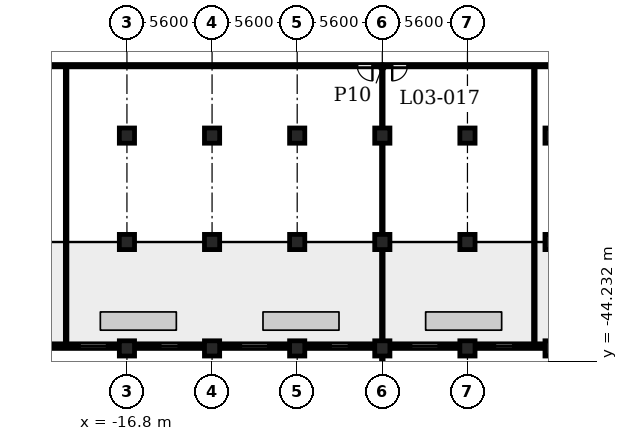
"""IFC4 building model, lengths in metres.
Left out: names, types, materials, properties, quantities, classifications, styles, units other than length and angle.
Written with IfcOpenShell. Run it as: python <this file> out.ifc"""

import sys

from ifc_helpers import new_model, si_unit, direction, frame, frame_2d, origin, origin_2d, place, context, subcontext, project, spatial, rectangle, circle, extrude, element, fill, save


model = new_model("IFC4")
c1 = context("Model", 3, precision=1e-05, world=origin(), true_north=direction((0.0, 1.0)))
c2 = subcontext(c1, "Body", "Model", "MODEL_VIEW")
j1 = project(units=[si_unit("LENGTHUNIT", "METRE"), si_unit("PLANEANGLEUNIT", "RADIAN")], contexts=[c1])
p1 = place(None, origin())
s1 = spatial("IfcSite", under=j1, at=p1, CompositionType="ELEMENT")
p2 = place(p1, origin())
s2 = spatial("IfcBuilding", under=s1, at=p2, CompositionType="ELEMENT")
p3 = place(p2, frame((0.0, 0.0, 16.1)))
s3 = spatial("IfcBuildingStorey", under=s2, at=p3, CompositionType="ELEMENT", Elevation=16.1)
for number, where, z_axis, x_axis in (
    (1, (-16.8, -29.4, 0.0), (0.0, 0.0, 1.0), (1.0, 0.0, 0.0)),
    (2, (-11.2, -29.4, 0.0), (0.0, 0.0, 1.0), (1.0, 0.0, 0.0)),
    (3, (-5.6, -29.4, 0.0), (0.0, 0.0, 1.0), (1.0, 0.0, 0.0)),
    (4, (0.0, -29.4, 0.0), (0.0, 0.0, 1.0), (1.0, 0.0, 0.0)),
    (5, (5.6, -29.4, 0.0), (0.0, 0.0, 1.0), (1.0, 0.0, 0.0)),
    (6, (11.2, -29.4, 0.0), (0.0, 0.0, 1.0), (1.0, 0.0, 0.0)),
    (7, (-16.8, -36.4, 0.0), (0.0, 0.0, 1.0), (1.0, 0.0, 0.0)),
    (8, (-11.2, -36.4, 0.0), (0.0, 0.0, 1.0), (1.0, 0.0, 0.0)),
    (9, (-5.6, -36.4, 0.0), (0.0, 0.0, 1.0), (1.0, 0.0, 0.0)),
    (10, (0.0, -36.4, 0.0), (0.0, 0.0, 1.0), (1.0, 0.0, 0.0)),
    (11, (5.6, -36.4, 0.0), (0.0, 0.0, 1.0), (1.0, 0.0, 0.0)),
    (12, (11.2, -36.4, 0.0), (0.0, 0.0, 1.0), (1.0, 0.0, 0.0)),
    (13, (-16.8, -43.4, 0.0), (0.0, 0.0, 1.0), (1.0, 0.0, 0.0)),
    (14, (-11.2, -43.4, 0.0), (0.0, 0.0, 1.0), (1.0, 0.0, 0.0)),
    (15, (-5.6, -43.4, 0.0), (0.0, 0.0, 1.0), (1.0, 0.0, 0.0)),
    (16, (0.0, -43.4, 0.0), (0.0, 0.0, 1.0), (1.0, 0.0, 0.0)),
    (17, (5.6, -43.4, 0.0), (0.0, 0.0, 1.0), (1.0, 0.0, 0.0)),
    (18, (11.2, -43.4, 0.0), (0.0, 0.0, 1.0), (1.0, 0.0, 0.0)),
):
    element("IfcColumn", number, at=place(p3, frame(where, z_axis=z_axis, x_axis=x_axis)), inside=s3, PredefinedType="COLUMN", context=c2, shape_type="SweptSolid", body=[
        extrude(circle(Radius=0.5, at=origin_2d()), origin(), (0.0, 0.0, 1.0), 4.8),
    ])
p4 = place(p3, frame((-21.9, -43.25, 0.0), z_axis=(0.0, 0.0, 1.0), x_axis=(1.0, 0.0, 0.0)))
e19 = element("IfcWall", 19, at=p4, inside=s3, PredefinedType="SOLIDWALL", context=c2, shape_type="SweptSolid", body=[
    extrude(rectangle(XDim=4.6, YDim=0.3, at=frame_2d((2.3, 0.0))), origin(), (0.0, 0.0, 1.0), 3.65),
])
p5 = place(p4, frame((1.988, 0.0, 0.9)))
e20 = element("IfcOpeningElement", 20, at=p5, cuts=e19, PredefinedType="OPENING", context=c2, shape_type="SweptSolid", body=[
    extrude(rectangle(XDim=1.8, YDim=1.25, at=frame_2d((0.9, 0.625))), frame((0.0, 0.16, 0.0), z_axis=(0.0, -1.0, 0.0), x_axis=(1.0, 0.0, 0.0)), (0.0, 0.0, 1.0), 0.32),
])
p6 = place(p3, frame((-16.3, -43.25, 0.0), z_axis=(0.0, 0.0, 1.0), x_axis=(1.0, 0.0, 0.0)))
e21 = element("IfcWall", 21, at=p6, inside=s3, PredefinedType="SOLIDWALL", context=c2, shape_type="SweptSolid", body=[
    extrude(rectangle(XDim=4.6, YDim=0.3, at=frame_2d((2.3, 0.0))), origin(), (0.0, 0.0, 1.0), 3.65),
])
p7 = place(p6, frame((1.7, 0.0, 0.6)))
e22 = element("IfcOpeningElement", 22, at=p7, cuts=e21, PredefinedType="OPENING", context=c2, shape_type="SweptSolid", body=[
    extrude(rectangle(XDim=1.2, YDim=1.55, at=frame_2d((0.6, 0.775))), frame((0.0, 0.16, 0.0), z_axis=(0.0, -1.0, 0.0), x_axis=(1.0, 0.0, 0.0)), (0.0, 0.0, 1.0), 0.32),
])
p8 = place(p3, frame((-10.7, -43.25, 0.0), z_axis=(0.0, 0.0, 1.0), x_axis=(1.0, 0.0, 0.0)))
e23 = element("IfcWall", 23, at=p8, inside=s3, PredefinedType="SOLIDWALL", context=c2, shape_type="SweptSolid", body=[
    extrude(rectangle(XDim=4.6, YDim=0.3, at=frame_2d((2.3, 0.0))), origin(), (0.0, 0.0, 1.0), 3.65),
])
p9 = place(p8, frame((1.4, 0.0, 0.9)))
e24 = element("IfcOpeningElement", 24, at=p9, cuts=e23, PredefinedType="OPENING", context=c2, shape_type="SweptSolid", body=[
    extrude(rectangle(XDim=1.8, YDim=1.25, at=frame_2d((0.9, 0.625))), frame((0.0, 0.16, 0.0), z_axis=(0.0, -1.0, 0.0), x_axis=(1.0, 0.0, 0.0)), (0.0, 0.0, 1.0), 0.32),
])
p10 = place(p3, frame((-5.1, -43.25, 0.0), z_axis=(0.0, 0.0, 1.0), x_axis=(1.0, 0.0, 0.0)))
e25 = element("IfcWall", 25, at=p10, inside=s3, PredefinedType="SOLIDWALL", context=c2, shape_type="SweptSolid", body=[
    extrude(rectangle(XDim=4.6, YDim=0.3, at=frame_2d((2.3, 0.0))), origin(), (0.0, 0.0, 1.0), 3.65),
])
p11 = place(p10, frame((1.7, 0.0, 0.6)))
e26 = element("IfcOpeningElement", 26, at=p11, cuts=e25, PredefinedType="OPENING", context=c2, shape_type="SweptSolid", body=[
    extrude(rectangle(XDim=1.2, YDim=1.55, at=frame_2d((0.6, 0.775))), frame((0.0, 0.16, 0.0), z_axis=(0.0, -1.0, 0.0), x_axis=(1.0, 0.0, 0.0)), (0.0, 0.0, 1.0), 0.32),
])
p12 = place(p3, frame((0.5, -43.25, 0.0), z_axis=(0.0, 0.0, 1.0), x_axis=(1.0, 0.0, 0.0)))
e27 = element("IfcWall", 27, at=p12, inside=s3, PredefinedType="SOLIDWALL", context=c2, shape_type="SweptSolid", body=[
    extrude(rectangle(XDim=4.6, YDim=0.3, at=frame_2d((2.3, 0.0))), origin(), (0.0, 0.0, 1.0), 3.65),
])
p13 = place(p12, frame((1.4, 0.0, 0.9)))
e28 = element("IfcOpeningElement", 28, at=p13, cuts=e27, PredefinedType="OPENING", context=c2, shape_type="SweptSolid", body=[
    extrude(rectangle(XDim=1.8, YDim=1.25, at=frame_2d((0.9, 0.625))), frame((0.0, 0.16, 0.0), z_axis=(0.0, -1.0, 0.0), x_axis=(1.0, 0.0, 0.0)), (0.0, 0.0, 1.0), 0.32),
])
p14 = place(p3, frame((6.1, -43.25, 0.0), z_axis=(0.0, 0.0, 1.0), x_axis=(1.0, 0.0, 0.0)))
e29 = element("IfcWall", 29, at=p14, inside=s3, PredefinedType="SOLIDWALL", context=c2, shape_type="SweptSolid", body=[
    extrude(rectangle(XDim=4.6, YDim=0.3, at=frame_2d((2.3, 0.0))), origin(), (0.0, 0.0, 1.0), 3.65),
])
p15 = place(p14, frame((1.312, 0.0, 0.6)))
e30 = element("IfcOpeningElement", 30, at=p15, cuts=e29, PredefinedType="OPENING", context=c2, shape_type="SweptSolid", body=[
    extrude(rectangle(XDim=1.2, YDim=1.55, at=frame_2d((0.6, 0.775))), frame((0.0, 0.16, 0.0), z_axis=(0.0, -1.0, 0.0), x_axis=(1.0, 0.0, 0.0)), (0.0, 0.0, 1.0), 0.32),
])
p16 = place(p3, frame((-37.0, -24.8, 0.0), z_axis=(0.0, 0.0, 1.0), x_axis=(1.0, 0.0, 0.0)))
e31 = element("IfcWall", 31, at=p16, inside=s3, PredefinedType="PARTITIONING", context=c2, shape_type="SweptSolid", body=[
    extrude(rectangle(XDim=74.0, YDim=0.15, at=frame_2d((37.0, 0.0))), origin(), (0.0, 0.0, 1.0), 4.45),
])
p17 = place(p16, frame((2.65, 0.0, 0.0)))
e32 = element("IfcOpeningElement", 32, at=p17, cuts=e31, PredefinedType="OPENING", context=c2, shape_type="SweptSolid", body=[
    extrude(rectangle(XDim=1.0, YDim=2.1, at=frame_2d((0.5, 1.05))), frame((0.0, 0.085, 0.0), z_axis=(0.0, -1.0, 0.0), x_axis=(1.0, 0.0, 0.0)), (0.0, 0.0, 1.0), 0.17),
])
p18 = place(p16, frame((4.85, 0.0, 0.0)))
e33 = element("IfcOpeningElement", 33, at=p18, cuts=e31, PredefinedType="OPENING", context=c2, shape_type="SweptSolid", body=[
    extrude(rectangle(XDim=1.0, YDim=2.1, at=frame_2d((0.5, 1.05))), frame((0.0, 0.085, 0.0), z_axis=(0.0, -1.0, 0.0), x_axis=(1.0, 0.0, 0.0)), (0.0, 0.0, 1.0), 0.17),
])
p19 = place(p16, frame((35.35, 0.0, 0.0)))
e34 = element("IfcOpeningElement", 34, at=p19, cuts=e31, PredefinedType="OPENING", context=c2, shape_type="SweptSolid", body=[
    extrude(rectangle(XDim=1.0, YDim=2.1, at=frame_2d((0.5, 1.05))), frame((0.0, 0.085, 0.0), z_axis=(0.0, -1.0, 0.0), x_axis=(1.0, 0.0, 0.0)), (0.0, 0.0, 1.0), 0.17),
])
p20 = place(p16, frame((37.65, 0.0, 0.0)))
e35 = element("IfcOpeningElement", 35, at=p20, cuts=e31, PredefinedType="OPENING", context=c2, shape_type="SweptSolid", body=[
    extrude(rectangle(XDim=1.0, YDim=2.1, at=frame_2d((0.5, 1.05))), frame((0.0, 0.085, 0.0), z_axis=(0.0, -1.0, 0.0), x_axis=(1.0, 0.0, 0.0)), (0.0, 0.0, 1.0), 0.17),
])
p21 = place(p16, frame((55.4, 0.0, 0.0)))
e36 = element("IfcOpeningElement", 36, at=p21, cuts=e31, PredefinedType="OPENING", context=c2, shape_type="SweptSolid", body=[
    extrude(rectangle(XDim=1.0, YDim=2.1, at=frame_2d((0.5, 1.05))), frame((0.0, 0.085, 0.0), z_axis=(0.0, -1.0, 0.0), x_axis=(1.0, 0.0, 0.0)), (0.0, 0.0, 1.0), 0.17),
])
p22 = place(p16, frame((57.645, 0.0, 0.0)))
e37 = element("IfcOpeningElement", 37, at=p22, cuts=e31, PredefinedType="OPENING", context=c2, shape_type="SweptSolid", body=[
    extrude(rectangle(XDim=1.0, YDim=2.1, at=frame_2d((0.5, 1.05))), frame((0.0, 0.085, 0.0), z_axis=(0.0, -1.0, 0.0), x_axis=(1.0, 0.0, 0.0)), (0.0, 0.0, 1.0), 0.17),
])
p23 = place(p16, frame((72.4, 0.0, 0.0)))
e38 = element("IfcOpeningElement", 38, at=p23, cuts=e31, PredefinedType="OPENING", context=c2, shape_type="SweptSolid", body=[
    extrude(rectangle(XDim=1.0, YDim=2.1, at=frame_2d((0.5, 1.05))), frame((0.0, 0.085, 0.0), z_axis=(0.0, -1.0, 0.0), x_axis=(1.0, 0.0, 0.0)), (0.0, 0.0, 1.0), 0.17),
])
p24 = place(p3, frame((-20.8, -43.08, 0.0), z_axis=(0.0, 0.0, 1.0), x_axis=(0.0, 1.0, 0.0)))
e39 = element("IfcWall", 39, at=p24, inside=s3, PredefinedType="PARTITIONING", context=c2, shape_type="SweptSolid", body=[
    extrude(rectangle(XDim=18.205, YDim=0.1, at=frame_2d((9.103, 0.0))), origin(), (0.0, 0.0, 1.0), 4.45),
])
p25 = place(p3, frame((0.0, -44.23, 0.0), z_axis=(0.0, 0.0, 1.0), x_axis=(0.0, 1.0, 0.0)))
e40 = element("IfcWall", 40, at=p25, inside=s3, PredefinedType="PARTITIONING", context=c2, shape_type="SweptSolid", body=[
    extrude(rectangle(XDim=19.355, YDim=0.1, at=frame_2d((9.677, 0.0))), origin(), (0.0, 0.0, 1.0), 4.45),
])
p26 = place(p3, frame((10.0, -43.08, 0.0), z_axis=(0.0, 0.0, 1.0), x_axis=(0.0, 1.0, 0.0)))
e41 = element("IfcWall", 41, at=p26, inside=s3, PredefinedType="PARTITIONING", context=c2, shape_type="SweptSolid", body=[
    extrude(rectangle(XDim=18.205, YDim=0.1, at=frame_2d((9.103, 0.0))), origin(), (0.0, 0.0, 1.0), 4.45),
])
p27 = place(p19, origin())
e42 = element("IfcDoor", 42, at=p27, inside=s3, OperationType="SINGLE_SWING_RIGHT", PredefinedType="DOOR", context=c2, shape_type="SweptSolid", body=[
    extrude(rectangle(XDim=1.0, YDim=2.1, at=frame_2d((0.5, 1.05))), frame((0.0, 0.025, 0.0), z_axis=(0.0, -1.0, 0.0), x_axis=(1.0, 0.0, 0.0)), (0.0, 0.0, 1.0), 0.05),
])
fill(e34, e42)
p28 = place(p20, origin())
e43 = element("IfcDoor", 43, at=p28, inside=s3, OperationType="SINGLE_SWING_LEFT", PredefinedType="DOOR", context=c2, shape_type="SweptSolid", body=[
    extrude(rectangle(XDim=1.0, YDim=2.1, at=frame_2d((0.5, 1.05))), frame((0.0, 0.025, 0.0), z_axis=(0.0, -1.0, 0.0), x_axis=(1.0, 0.0, 0.0)), (0.0, 0.0, 1.0), 0.05),
])
fill(e35, e43)
p29 = place(p5, origin())
e44 = element("IfcWindow", 44, at=p29, inside=s3, PartitioningType="SINGLE_PANEL", PredefinedType="WINDOW", context=c2, shape_type="SweptSolid", body=[
    extrude(rectangle(XDim=1.8, YDim=1.25, at=frame_2d((0.9, 0.625))), frame((0.0, 0.03, 0.0), z_axis=(0.0, -1.0, 0.0), x_axis=(1.0, 0.0, 0.0)), (0.0, 0.0, 1.0), 0.06),
])
fill(e20, e44)
p30 = place(p7, origin())
e45 = element("IfcWindow", 45, at=p30, inside=s3, PartitioningType="SINGLE_PANEL", PredefinedType="WINDOW", context=c2, shape_type="SweptSolid", body=[
    extrude(rectangle(XDim=1.2, YDim=1.55, at=frame_2d((0.6, 0.775))), frame((0.0, 0.03, 0.0), z_axis=(0.0, -1.0, 0.0), x_axis=(1.0, 0.0, 0.0)), (0.0, 0.0, 1.0), 0.06),
])
fill(e22, e45)
p31 = place(p9, origin())
e46 = element("IfcWindow", 46, at=p31, inside=s3, PartitioningType="SINGLE_PANEL", PredefinedType="WINDOW", context=c2, shape_type="SweptSolid", body=[
    extrude(rectangle(XDim=1.8, YDim=1.25, at=frame_2d((0.9, 0.625))), frame((0.0, 0.03, 0.0), z_axis=(0.0, -1.0, 0.0), x_axis=(1.0, 0.0, 0.0)), (0.0, 0.0, 1.0), 0.06),
])
fill(e24, e46)
p32 = place(p11, origin())
e47 = element("IfcWindow", 47, at=p32, inside=s3, PartitioningType="SINGLE_PANEL", PredefinedType="WINDOW", context=c2, shape_type="SweptSolid", body=[
    extrude(rectangle(XDim=1.2, YDim=1.55, at=frame_2d((0.6, 0.775))), frame((0.0, 0.03, 0.0), z_axis=(0.0, -1.0, 0.0), x_axis=(1.0, 0.0, 0.0)), (0.0, 0.0, 1.0), 0.06),
])
fill(e26, e47)
p33 = place(p13, origin())
e48 = element("IfcWindow", 48, at=p33, inside=s3, PartitioningType="SINGLE_PANEL", PredefinedType="WINDOW", context=c2, shape_type="SweptSolid", body=[
    extrude(rectangle(XDim=1.8, YDim=1.25, at=frame_2d((0.9, 0.625))), frame((0.0, 0.03, 0.0), z_axis=(0.0, -1.0, 0.0), x_axis=(1.0, 0.0, 0.0)), (0.0, 0.0, 1.0), 0.06),
])
fill(e28, e48)
p34 = place(p15, origin())
e49 = element("IfcWindow", 49, at=p34, inside=s3, PartitioningType="SINGLE_PANEL", PredefinedType="WINDOW", context=c2, shape_type="SweptSolid", body=[
    extrude(rectangle(XDim=1.2, YDim=1.55, at=frame_2d((0.6, 0.775))), frame((0.0, 0.03, 0.0), z_axis=(0.0, -1.0, 0.0), x_axis=(1.0, 0.0, 0.0)), (0.0, 0.0, 1.0), 0.06),
])
fill(e30, e49)
save(model, sys.argv[1])
